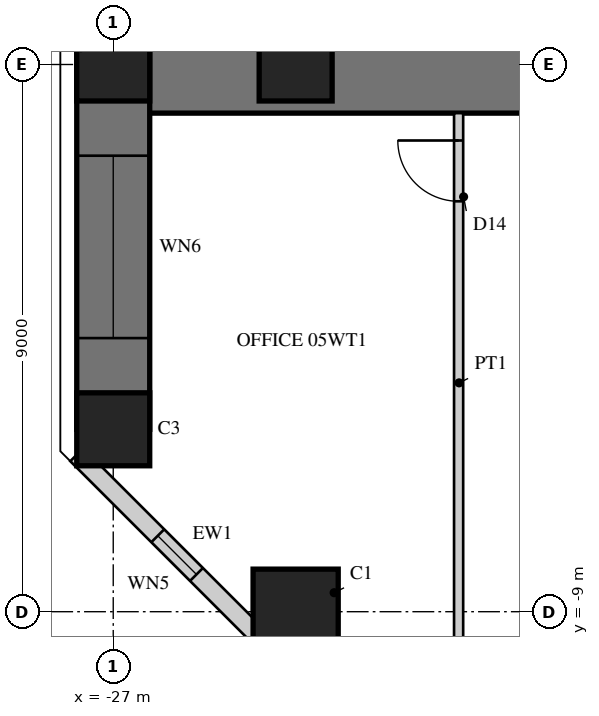
"""IFC4 building model, lengths in metres.
Left out: names, types, materials, properties, quantities, classifications, styles, units other than length and angle.
Written with IfcOpenShell. Run it as: python <this file> out.ifc"""

import sys

from ifc_helpers import new_model, si_unit, direction, frame, frame_2d, origin, origin_2d, place, context, subcontext, project, spatial, rectangle, hollow_rectangle, extrude, element, fill, save


model = new_model("IFC4")
c1 = context("Model", 3, precision=1e-05, world=origin(), true_north=direction((0.0, 1.0)))
c2 = subcontext(c1, "Body", "Model", "MODEL_VIEW")
j1 = project(units=[si_unit("LENGTHUNIT", "METRE"), si_unit("PLANEANGLEUNIT", "RADIAN")], contexts=[c1])
p1 = place(None, origin())
s1 = spatial("IfcSite", under=j1, at=p1, CompositionType="ELEMENT")
p2 = place(p1, origin())
s2 = spatial("IfcBuilding", under=s1, at=p2, CompositionType="ELEMENT")
p3 = place(p2, frame((0.0, 0.0, 23.5)))
s3 = spatial("IfcBuildingStorey", under=s2, at=p3, CompositionType="ELEMENT", Elevation=23.5)
p4 = place(p3, frame((-9.0, 0.0, 0.0), z_axis=(0.0, 0.0, 1.0), x_axis=(-1.0, 0.0, 0.0)))
e1 = element("IfcWall", 1, at=p4, inside=s3, PredefinedType="SHEAR", context=c2, shape_type="SweptSolid", body=[
    extrude(rectangle(XDim=18.0, YDim=1.6, at=frame_2d((9.0, 0.0))), origin(), (0.0, 0.0, 1.0), 4.0),
])
p5 = place(p4, frame((9.9, 0.0, 0.0)))
e2 = element("IfcOpeningElement", 2, at=p5, cuts=e1, PredefinedType="OPENING", context=c2, shape_type="SweptSolid", body=[
    extrude(rectangle(XDim=1.0, YDim=2.2, at=frame_2d((0.5, 1.1))), frame((0.0, 0.81, 0.0), z_axis=(0.0, -1.0, 0.0), x_axis=(1.0, 0.0, 0.0)), (0.0, 0.0, 1.0), 1.62),
])
p6 = place(p3, frame((-27.0, 6.0, 0.0), z_axis=(0.0, 0.0, 1.0), x_axis=(0.0, -1.0, 0.0)))
e3 = element("IfcWall", 3, at=p6, inside=s3, PredefinedType="SHEAR", context=c2, shape_type="SweptSolid", body=[
    extrude(rectangle(XDim=12.0, YDim=1.2, at=frame_2d((6.0, 0.0))), origin(), (0.0, 0.0, 1.0), 4.0),
])
p7 = place(p6, frame((1.5, 0.0, 0.6)))
e4 = element("IfcOpeningElement", 4, at=p7, cuts=e3, PredefinedType="OPENING", context=c2, shape_type="SweptSolid", body=[
    extrude(rectangle(XDim=3.0, YDim=2.4, at=frame_2d((1.5, 1.2))), frame((0.0, 0.61, 0.0), z_axis=(0.0, -1.0, 0.0), x_axis=(1.0, 0.0, 0.0)), (0.0, 0.0, 1.0), 1.22),
])
p8 = place(p6, frame((7.5, 0.0, 0.6)))
e5 = element("IfcOpeningElement", 5, at=p8, cuts=e3, PredefinedType="OPENING", context=c2, shape_type="SweptSolid", body=[
    extrude(rectangle(XDim=3.0, YDim=2.4, at=frame_2d((1.5, 1.2))), frame((0.0, 0.61, 0.0), z_axis=(0.0, -1.0, 0.0), x_axis=(1.0, 0.0, 0.0)), (0.0, 0.0, 1.0), 1.22),
])
p9 = place(p3, frame((-24.0, -9.0, 0.0), z_axis=(0.0, 0.0, 1.0), x_axis=(1.0, 0.0, 0.0)))
e6 = element("IfcColumn", 6, at=p9, inside=s3, PredefinedType="COLUMN", context=c2, shape_type="SweptSolid", body=[
    extrude(rectangle(XDim=1.4, YDim=1.4, at=origin_2d()), origin(), (0.0, 0.0, 1.0), 4.0),
])
for number, where, z_axis, x_axis in (
    (7, (-27.0, 0.0, 0.0), (0.0, 0.0, 1.0), (1.0, 0.0, 0.0)),
    (8, (-27.0, -6.0, 0.0), (0.0, 0.0, 1.0), (1.0, 0.0, 0.0)),
    (9, (-24.0, 0.0, 0.0), (0.0, 0.0, 1.0), (1.0, 0.0, 0.0)),
):
    element("IfcColumn", number, at=place(p3, frame(where, z_axis=z_axis, x_axis=x_axis)), inside=s3, PredefinedType="COLUMN", context=c2, shape_type="SweptSolid", body=[
        extrude(rectangle(XDim=1.2, YDim=1.2, at=origin_2d()), origin(), (0.0, 0.0, 1.0), 4.0),
    ])
p10 = place(p3, frame((-27.6, -6.418, 0.0), z_axis=(0.0, 0.0, 1.0), x_axis=(0.707106781187, -0.707106781187, 0.0)))
e10 = element("IfcWall", 10, at=p10, inside=s3, PredefinedType="SOLIDWALL", context=c2, shape_type="SweptSolid", body=[
    extrude(rectangle(XDim=4.669, YDim=0.3, at=frame_2d((2.335, 0.0))), origin(), (0.0, 0.0, 1.0), 3.8),
])
p11 = place(p10, frame((1.885, 0.0, 0.3)))
e11 = element("IfcOpeningElement", 11, at=p11, cuts=e10, PredefinedType="OPENING", context=c2, shape_type="SweptSolid", body=[
    extrude(rectangle(XDim=0.9, YDim=2.4, at=frame_2d((0.45, 1.2))), frame((0.0, 0.16, 0.0), z_axis=(0.0, -1.0, 0.0), x_axis=(1.0, 0.0, 0.0)), (0.0, 0.0, 1.0), 0.32),
])
p12 = place(p3, frame((-21.32, -0.8, 0.0), z_axis=(0.0, 0.0, 1.0), x_axis=(0.0, -1.0, 0.0)))
e12 = element("IfcWall", 12, at=p12, inside=s3, PredefinedType="PARTITIONING", context=c2, shape_type="SweptSolid", body=[
    extrude(rectangle(XDim=8.88, YDim=0.15, at=frame_2d((4.44, 0.0))), origin(), (0.0, 0.0, 1.0), 3.8),
])
p13 = place(p12, frame((0.45, 0.0, 0.0)))
e13 = element("IfcOpeningElement", 13, at=p13, cuts=e12, PredefinedType="OPENING", context=c2, shape_type="SweptSolid", body=[
    extrude(rectangle(XDim=1.0, YDim=2.2, at=frame_2d((0.5, 1.1))), frame((0.0, 0.085, 0.0), z_axis=(0.0, -1.0, 0.0), x_axis=(1.0, 0.0, 0.0)), (0.0, 0.0, 1.0), 0.17),
])
p14 = place(p8, origin())
e14 = element("IfcWindow", 14, at=p14, inside=s3, PartitioningType="SINGLE_PANEL", PredefinedType="WINDOW", context=c2, shape_type="SweptSolid", body=[
    extrude(hollow_rectangle(XDim=3.0, YDim=2.4, WallThickness=0.06, at=frame_2d((1.5, 1.2))), frame((0.0, 0.03, 0.0), z_axis=(0.0, -1.0, 0.0), x_axis=(1.0, 0.0, 0.0)), (0.0, 0.0, 1.0), 0.06),
    extrude(rectangle(XDim=2.879, YDim=2.279, at=frame_2d((1.5, 1.2))), frame((0.0, 0.03, 0.0), z_axis=(0.0, -1.0, 0.0), x_axis=(1.0, 0.0, 0.0)), (0.0, 0.0, 1.0), 0.06),
])
fill(e5, e14)
p15 = place(p11, origin())
e15 = element("IfcWindow", 15, at=p15, inside=s3, PartitioningType="SINGLE_PANEL", PredefinedType="WINDOW", context=c2, shape_type="SweptSolid", body=[
    extrude(hollow_rectangle(XDim=0.9, YDim=2.4, WallThickness=0.06, at=frame_2d((0.45, 1.2))), frame((0.0, 0.03, 0.0), z_axis=(0.0, -1.0, 0.0), x_axis=(1.0, 0.0, 0.0)), (0.0, 0.0, 1.0), 0.06),
    extrude(rectangle(XDim=0.779, YDim=2.279, at=frame_2d((0.45, 1.2))), frame((0.0, 0.03, 0.0), z_axis=(0.0, -1.0, 0.0), x_axis=(1.0, 0.0, 0.0)), (0.0, 0.0, 1.0), 0.06),
])
fill(e11, e15)
p16 = place(p13, frame((1.0, 0.0, 0.0), z_axis=(0.0, 0.0, 1.0), x_axis=(-1.0, 0.0, 0.0)))
e16 = element("IfcDoor", 16, at=p16, inside=s3, OperationType="SINGLE_SWING_RIGHT", PredefinedType="DOOR", context=c2, shape_type="SweptSolid", body=[
    extrude(rectangle(XDim=1.0, YDim=2.2, at=frame_2d((0.5, 1.1))), frame((0.0, 0.025, 0.0), z_axis=(0.0, -1.0, 0.0), x_axis=(1.0, 0.0, 0.0)), (0.0, 0.0, 1.0), 0.05),
])
fill(e13, e16)
save(model, sys.argv[1])
